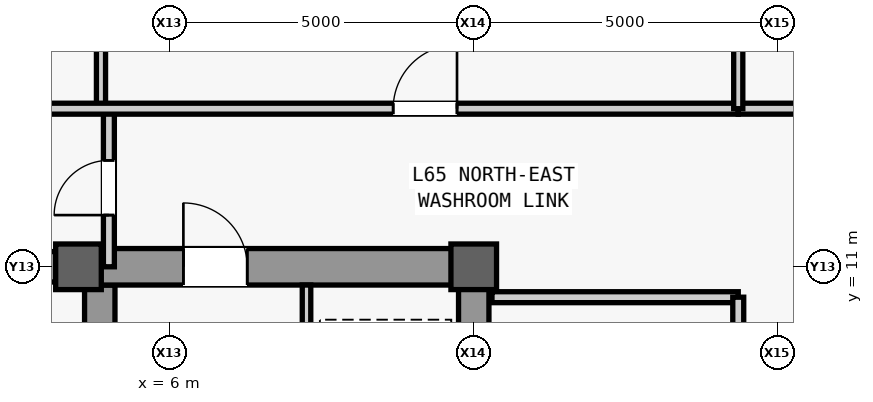
"""IFC4 building model, lengths in metres.
Left out: names, types, materials, properties, quantities, classifications, styles, units other than length and angle.
Written with IfcOpenShell. Run it as: python <this file> out.ifc"""

import sys

from ifc_helpers import new_model, si_unit, direction, frame, frame_2d, origin, origin_2d, place, context, subcontext, project, spatial, rectangle, extrude, source, transform, mapped, element, fill, save


model = new_model("IFC4")
c1 = context("Model", 3, precision=1e-05, world=origin(), true_north=direction((0.0, 1.0)))
c2 = subcontext(c1, "Body", "Model", "MODEL_VIEW")
j1 = project(units=[si_unit("LENGTHUNIT", "METRE"), si_unit("PLANEANGLEUNIT", "RADIAN")], contexts=[c1])
p1 = place(None, origin())
s1 = spatial("IfcSite", under=j1, at=p1, CompositionType="ELEMENT")
p2 = place(p1, origin())
s2 = spatial("IfcBuilding", under=s1, at=p2, CompositionType="ELEMENT")
p3 = place(p2, frame((0.0, 0.0, 277.5)))
s3 = spatial("IfcBuildingStorey", under=s2, at=p3, CompositionType="ELEMENT", Elevation=277.5)
m1 = source(origin(), c2, "Body", "SweptSolid", [
    extrude(rectangle(XDim=22.0, YDim=0.5, at=frame_2d((11.0, 0.0))), origin(), (0.0, 0.0, 1.0), 3.78),
])
p4 = place(p3, frame((11.0, -11.0, 0.0), z_axis=(0.0, 0.0, 1.0), x_axis=(0.0, 1.0, 0.0)))
e1 = element("IfcWall", 1, at=p4, inside=s3, PredefinedType="SHEAR", context=c2, shape_type="MappedRepresentation", body=[
    mapped(m1, transform((0.0, 0.0, 0.0), scale=1.0)),
])
m2 = source(origin(), c2, "Body", "SweptSolid", [
    extrude(rectangle(XDim=1.1, YDim=2.2, at=frame_2d((0.55, 1.1))), frame((0.0, 0.26, 0.0), z_axis=(0.0, -1.0, 0.0), x_axis=(1.0, 0.0, 0.0)), (0.0, 0.0, 1.0), 0.52),
])
p5 = place(p4, frame((0.8, 0.0, 0.0)))
e2 = element("IfcOpeningElement", 2, at=p5, cuts=e1, PredefinedType="OPENING", context=c2, shape_type="MappedRepresentation", body=[
    mapped(m2, transform((0.0, 0.0, 0.0), scale=1.0)),
])
m3 = source(origin(), c2, "Body", "SweptSolid", [
    extrude(rectangle(XDim=0.9, YDim=2.15, at=frame_2d((0.45, 1.075))), frame((0.0, 0.26, 0.0), z_axis=(0.0, -1.0, 0.0), x_axis=(1.0, 0.0, 0.0)), (0.0, 0.0, 1.0), 0.52),
])
p6 = place(p4, frame((6.2, 0.0, 0.0)))
e3 = element("IfcOpeningElement", 3, at=p6, cuts=e1, PredefinedType="OPENING", context=c2, shape_type="MappedRepresentation", body=[
    mapped(m3, transform((0.0, 0.0, 0.0), scale=1.0)),
])
p7 = place(p4, frame((8.525, 0.0, 0.0)))
e4 = element("IfcOpeningElement", 4, at=p7, cuts=e1, PredefinedType="OPENING", context=c2, shape_type="MappedRepresentation", body=[
    mapped(m3, transform((0.0, 0.0, 0.0), scale=1.0)),
])
m4 = source(origin(), c2, "Body", "SweptSolid", [
    extrude(rectangle(XDim=1.2, YDim=2.3, at=frame_2d((0.6, 1.15))), frame((0.0, 0.26, 0.0), z_axis=(0.0, -1.0, 0.0), x_axis=(1.0, 0.0, 0.0)), (0.0, 0.0, 1.0), 0.52),
])
p8 = place(p4, frame((17.6, 0.0, 0.0)))
e5 = element("IfcOpeningElement", 5, at=p8, cuts=e1, PredefinedType="OPENING", context=c2, shape_type="MappedRepresentation", body=[
    mapped(m4, transform((0.0, 0.0, 0.0), scale=1.0)),
])
p9 = place(p4, frame((19.6, 0.0, 0.0)))
e6 = element("IfcOpeningElement", 6, at=p9, cuts=e1, PredefinedType="OPENING", context=c2, shape_type="MappedRepresentation", body=[
    mapped(m4, transform((0.0, 0.0, 0.0), scale=1.0)),
])
m5 = source(origin(), c2, "Body", "SweptSolid", [
    extrude(rectangle(XDim=1.3, YDim=2.3, at=frame_2d((0.65, 1.15))), frame((0.0, 0.26, 0.0), z_axis=(0.0, -1.0, 0.0), x_axis=(1.0, 0.0, 0.0)), (0.0, 0.0, 1.0), 0.52),
])
p10 = place(p4, frame((2.7, 0.0, 0.0)))
e7 = element("IfcOpeningElement", 7, at=p10, cuts=e1, PredefinedType="OPENING", context=c2, shape_type="MappedRepresentation", body=[
    mapped(m5, transform((0.0, 0.0, 0.0), scale=1.0)),
])
p11 = place(p4, frame((13.35, 0.0, 0.0)))
e8 = element("IfcOpeningElement", 8, at=p11, cuts=e1, PredefinedType="OPENING", context=c2, shape_type="MappedRepresentation", body=[
    mapped(m5, transform((0.0, 0.0, 0.0), scale=1.0)),
])
m6 = source(origin(), c2, "Body", "SweptSolid", [
    extrude(rectangle(XDim=21.4, YDim=0.5, at=frame_2d((10.7, 0.0))), origin(), (0.0, 0.0, 1.0), 3.78),
])
p12 = place(p3, frame((4.85, -10.7, 0.0), z_axis=(0.0, 0.0, 1.0), x_axis=(0.0, 1.0, 0.0)))
e9 = element("IfcWall", 9, at=p12, inside=s3, PredefinedType="SHEAR", context=c2, shape_type="MappedRepresentation", body=[
    mapped(m6, transform((0.0, 0.0, 0.0), scale=1.0)),
])
m7 = source(origin(), c2, "Body", "SweptSolid", [
    extrude(rectangle(XDim=5.9, YDim=0.6, at=frame_2d((2.95, 0.0))), origin(), (0.0, 0.0, 1.0), 3.78),
])
p13 = place(p3, frame((4.85, 11.0, 0.0), z_axis=(0.0, 0.0, 1.0), x_axis=(1.0, 0.0, 0.0)))
e10 = element("IfcWall", 10, at=p13, inside=s3, PredefinedType="SHEAR", context=c2, shape_type="MappedRepresentation", body=[
    mapped(m7, transform((0.0, 0.0, 0.0), scale=1.0)),
])
m8 = source(origin(), c2, "Body", "SweptSolid", [
    extrude(rectangle(XDim=1.05, YDim=2.2, at=frame_2d((0.525, 1.1))), frame((0.0, 0.31, 0.0), z_axis=(0.0, -1.0, 0.0), x_axis=(1.0, 0.0, 0.0)), (0.0, 0.0, 1.0), 0.62),
])
p14 = place(p13, frame((1.375, 0.0, 0.0)))
e11 = element("IfcOpeningElement", 11, at=p14, cuts=e10, PredefinedType="OPENING", context=c2, shape_type="MappedRepresentation", body=[
    mapped(m8, transform((0.0, 0.0, 0.0), scale=1.0)),
])
m9 = source(origin(), c2, "Body", "SweptSolid", [
    extrude(rectangle(XDim=9.2, YDim=0.5, at=frame_2d((4.6, 0.0))), origin(), (0.0, 0.0, 1.0), 3.78),
])
p15 = place(p3, frame((-4.6, 11.0, 0.0), z_axis=(0.0, 0.0, 1.0), x_axis=(1.0, 0.0, 0.0)))
e12 = element("IfcWall", 12, at=p15, inside=s3, PredefinedType="SHEAR", context=c2, shape_type="MappedRepresentation", body=[
    mapped(m9, transform((0.0, 0.0, 0.0), scale=1.0)),
])
m10 = source(origin(), c2, "Body", "SweptSolid", [
    extrude(rectangle(XDim=0.75, YDim=0.75, at=origin_2d()), origin(), (0.0, 0.0, 1.0), 4.0),
])
for number, where, z_axis, x_axis in (
    (13, (4.5, 11.0, 0.0), (0.0, 0.0, 1.0), (1.0, 0.0, 0.0)),
    (14, (11.0, 11.0, 0.0), (0.0, 0.0, 1.0), (1.0, 0.0, 0.0)),
):
    element("IfcColumn", number, at=place(p3, frame(where, z_axis=z_axis, x_axis=x_axis)), inside=s3, PredefinedType="COLUMN", context=c2, shape_type="MappedRepresentation", body=[
        mapped(m10, transform((0.0, 0.0, 0.0), scale=1.0)),
    ])
m11 = source(origin(), c2, "Body", "SweptSolid", [
    extrude(rectangle(XDim=9.4, YDim=0.14, at=frame_2d((4.7, 0.0))), origin(), (0.0, 0.0, 1.0), 3.78),
])
p16 = place(p3, frame((8.25, 1.3, 0.0), z_axis=(0.0, 0.0, 1.0), x_axis=(0.0, 1.0, 0.0)))
e15 = element("IfcWall", 15, at=p16, inside=s3, PredefinedType="PARTITIONING", context=c2, shape_type="MappedRepresentation", body=[
    mapped(m11, transform((0.0, 0.0, 0.0), scale=1.0)),
])
m12 = source(origin(), c2, "Body", "SweptSolid", [
    extrude(rectangle(XDim=4.05, YDim=0.18, at=frame_2d((2.025, 0.0))), origin(), (0.0, 0.0, 1.0), 3.78),
])
p17 = place(p3, frame((11.3, 10.5, 0.0), z_axis=(0.0, 0.0, 1.0), x_axis=(1.0, 0.0, 0.0)))
e16 = element("IfcWall", 16, at=p17, inside=s3, PredefinedType="PARTITIONING", context=c2, shape_type="MappedRepresentation", body=[
    mapped(m12, transform((0.0, 0.0, 0.0), scale=1.0)),
])
m13 = source(origin(), c2, "Body", "SweptSolid", [
    extrude(rectangle(XDim=16.6, YDim=0.18, at=frame_2d((8.3, 0.0))), origin(), (0.0, 0.0, 1.0), 3.78),
])
p18 = place(p3, frame((15.35, -6.1, 0.0), z_axis=(0.0, 0.0, 1.0), x_axis=(0.0, 1.0, 0.0)))
e17 = element("IfcWall", 17, at=p18, inside=s3, PredefinedType="PARTITIONING", context=c2, shape_type="MappedRepresentation", body=[
    mapped(m13, transform((0.0, 0.0, 0.0), scale=1.0)),
])
m14 = source(origin(), c2, "Body", "SweptSolid", [
    extrude(rectangle(XDim=1.8, YDim=2.25, at=frame_2d((0.9, 1.125))), frame((0.0, 0.1, 0.0), z_axis=(0.0, -1.0, 0.0), x_axis=(1.0, 0.0, 0.0)), (0.0, 0.0, 1.0), 0.2),
])
p19 = place(p18, frame((2.7, 0.0, 0.0)))
e18 = element("IfcOpeningElement", 18, at=p19, cuts=e17, PredefinedType="OPENING", context=c2, shape_type="MappedRepresentation", body=[
    mapped(m14, transform((0.0, 0.0, 0.0), scale=1.0)),
])
p20 = place(p18, frame((13.0, 0.0, 0.0)))
e19 = element("IfcOpeningElement", 19, at=p20, cuts=e17, PredefinedType="OPENING", context=c2, shape_type="MappedRepresentation", body=[
    mapped(m14, transform((0.0, 0.0, 0.0), scale=1.0)),
])
m15 = source(origin(), c2, "Body", "SweptSolid", [
    extrude(rectangle(XDim=2.6, YDim=0.18, at=frame_2d((1.3, 0.0))), origin(), (0.0, 0.0, 1.0), 3.78),
])
p21 = place(p3, frame((5.0, 11.0, 0.0), z_axis=(0.0, 0.0, 1.0), x_axis=(0.0, 1.0, 0.0)))
e20 = element("IfcWall", 20, at=p21, inside=s3, PredefinedType="PARTITIONING", context=c2, shape_type="MappedRepresentation", body=[
    mapped(m15, transform((0.0, 0.0, 0.0), scale=1.0)),
])
m16 = source(origin(), c2, "Body", "SweptSolid", [
    extrude(rectangle(XDim=0.9, YDim=2.15, at=frame_2d((0.45, 1.075))), frame((0.0, 0.1, 0.0), z_axis=(0.0, -1.0, 0.0), x_axis=(1.0, 0.0, 0.0)), (0.0, 0.0, 1.0), 0.2),
])
p22 = place(p21, frame((0.85, 0.0, 0.0)))
e21 = element("IfcOpeningElement", 21, at=p22, cuts=e20, PredefinedType="OPENING", context=c2, shape_type="MappedRepresentation", body=[
    mapped(m16, transform((0.0, 0.0, 0.0), scale=1.0)),
])
m17 = source(origin(), c2, "Body", "SweptSolid", [
    extrude(rectangle(XDim=2.4, YDim=0.18, at=frame_2d((1.2, 0.0))), origin(), (0.0, 0.0, 1.0), 3.78),
])
p23 = place(p3, frame((15.35, 13.6, 0.0), z_axis=(0.0, 0.0, 1.0), x_axis=(1.0, 0.0, 0.0)))
e22 = element("IfcWall", 22, at=p23, inside=s3, PredefinedType="PARTITIONING", context=c2, shape_type="MappedRepresentation", body=[
    mapped(m17, transform((0.0, 0.0, 0.0), scale=1.0)),
])
m18 = source(origin(), c2, "Body", "SweptSolid", [
    extrude(rectangle(XDim=14.4, YDim=0.15, at=frame_2d((7.2, 0.0))), origin(), (0.0, 0.0, 1.0), 3.78),
])
p24 = place(p3, frame((4.87, 13.6, 0.0), z_axis=(0.0, 0.0, 1.0), x_axis=(0.0, 1.0, 0.0)))
e23 = element("IfcWall", 23, at=p24, inside=s3, PredefinedType="PARTITIONING", context=c2, shape_type="MappedRepresentation", body=[
    mapped(m18, transform((0.0, 0.0, 0.0), scale=1.0)),
])
m19 = source(origin(), c2, "Body", "SweptSolid", [
    extrude(rectangle(XDim=0.95, YDim=2.15, at=frame_2d((0.475, 1.075))), frame((0.0, 0.085, 0.0), z_axis=(0.0, -1.0, 0.0), x_axis=(1.0, 0.0, 0.0)), (0.0, 0.0, 1.0), 0.17),
])
p25 = place(p24, frame((2.981, 0.0, 0.0)))
e24 = element("IfcOpeningElement", 24, at=p25, cuts=e23, PredefinedType="OPENING", context=c2, shape_type="MappedRepresentation", body=[
    mapped(m19, transform((0.0, 0.0, 0.0), scale=1.0)),
])
m20 = source(origin(), c2, "Body", "SweptSolid", [
    extrude(rectangle(XDim=32.75, YDim=0.18, at=frame_2d((16.375, 0.0))), origin(), (0.0, 0.0, 1.0), 3.78),
])
p26 = place(p3, frame((-17.4, 13.6, 0.0), z_axis=(0.0, 0.0, 1.0), x_axis=(1.0, 0.0, 0.0)))
e25 = element("IfcWall", 25, at=p26, inside=s3, PredefinedType="PARTITIONING", context=c2, shape_type="MappedRepresentation", body=[
    mapped(m20, transform((0.0, 0.0, 0.0), scale=1.0)),
])
m21 = source(origin(), c2, "Body", "SweptSolid", [
    extrude(rectangle(XDim=1.05, YDim=2.2, at=frame_2d((0.525, 1.1))), frame((0.0, 0.1, 0.0), z_axis=(0.0, -1.0, 0.0), x_axis=(1.0, 0.0, 0.0)), (0.0, 0.0, 1.0), 0.2),
])
p27 = place(p26, frame((27.075, 0.0, 0.0)))
e26 = element("IfcOpeningElement", 26, at=p27, cuts=e25, PredefinedType="OPENING", context=c2, shape_type="MappedRepresentation", body=[
    mapped(m21, transform((0.0, 0.0, 0.0), scale=1.0)),
])
p28 = place(p3, frame((15.35, 13.6, 0.0), z_axis=(0.0, 0.0, 1.0), x_axis=(0.0, 1.0, 0.0)))
e27 = element("IfcWall", 27, at=p28, inside=s3, PredefinedType="PARTITIONING", context=c2, shape_type="MappedRepresentation", body=[
    mapped(m18, transform((0.0, 0.0, 0.0), scale=1.0)),
])
m22 = source(origin(), c2, "Body", "SweptSolid", [
    extrude(rectangle(XDim=1.05, YDim=2.2, at=frame_2d((0.525, 1.1))), frame((0.0, 0.025, 0.0), z_axis=(0.0, -1.0, 0.0), x_axis=(1.0, 0.0, 0.0)), (0.0, 0.0, 1.0), 0.05),
])
p29 = place(p14, origin())
e28 = element("IfcDoor", 28, at=p29, inside=s3, OperationType="SINGLE_SWING_LEFT", PredefinedType="DOOR", context=c2, shape_type="MappedRepresentation", body=[
    mapped(m22, transform((0.0, 0.0, 0.0), scale=1.0)),
])
fill(e11, e28)
m23 = source(origin(), c2, "Body", "SweptSolid", [
    extrude(rectangle(XDim=0.9, YDim=2.15, at=frame_2d((0.45, 1.075))), frame((0.0, 0.025, 0.0), z_axis=(0.0, -1.0, 0.0), x_axis=(1.0, 0.0, 0.0)), (0.0, 0.0, 1.0), 0.05),
])
p30 = place(p22, origin())
e29 = element("IfcDoor", 29, at=p30, inside=s3, OperationType="SINGLE_SWING_LEFT", PredefinedType="DOOR", context=c2, shape_type="MappedRepresentation", body=[
    mapped(m23, transform((0.0, 0.0, 0.0), scale=1.0)),
])
fill(e21, e29)
p31 = place(p27, origin())
e30 = element("IfcDoor", 30, at=p31, inside=s3, OperationType="SINGLE_SWING_RIGHT", PredefinedType="DOOR", context=c2, shape_type="MappedRepresentation", body=[
    mapped(m22, transform((0.0, 0.0, 0.0), scale=1.0)),
])
fill(e26, e30)
save(model, sys.argv[1])
